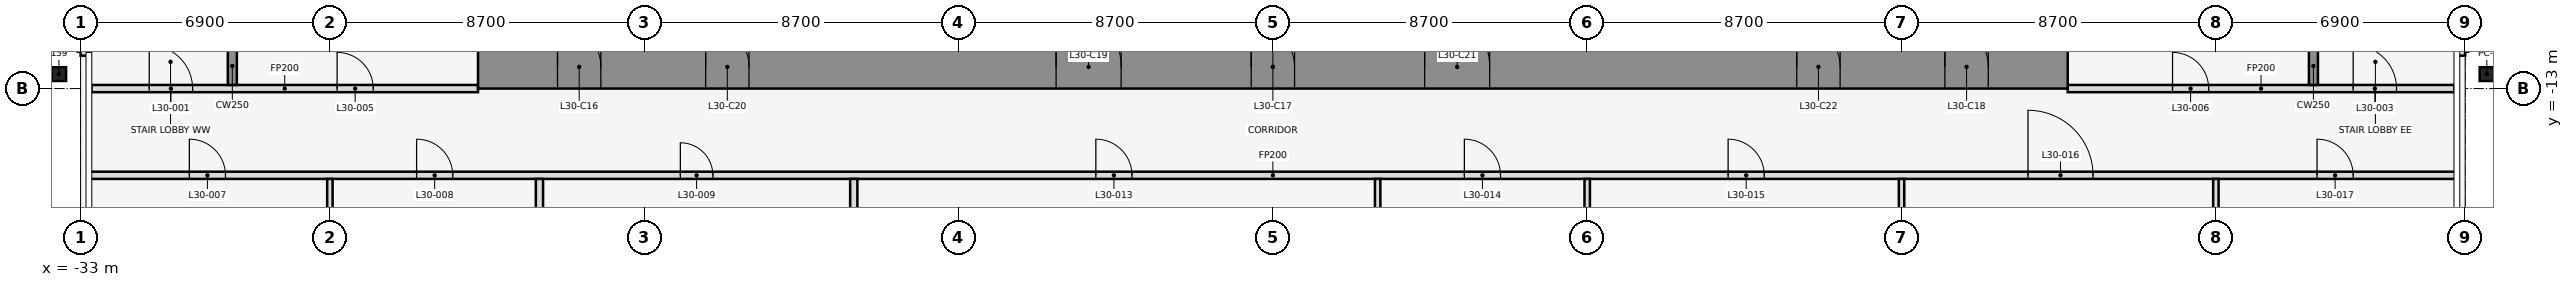
"""IFC4 building model, lengths in metres.
Left out: names, types, materials, properties, quantities, classifications, styles, units other than length and angle.
Written with IfcOpenShell. Run it as: python <this file> out.ifc"""

import sys

from ifc_helpers import new_model, si_unit, direction, frame, frame_2d, origin, origin_2d, place, context, subcontext, project, spatial, rectangle, i_section, extrude, element, fill, save


model = new_model("IFC4")
c1 = context("Model", 3, precision=1e-05, world=origin(), true_north=direction((0.0, 1.0)))
c2 = subcontext(c1, "Body", "Model", "MODEL_VIEW")
j1 = project(units=[si_unit("LENGTHUNIT", "METRE"), si_unit("PLANEANGLEUNIT", "RADIAN")], contexts=[c1])
p1 = place(None, origin())
s1 = spatial("IfcSite", under=j1, at=p1, CompositionType="ELEMENT")
p2 = place(p1, origin())
s2 = spatial("IfcBuilding", under=s1, at=p2, CompositionType="ELEMENT")
p3 = place(p2, frame((0.0, 0.0, 140.4)))
s3 = spatial("IfcBuildingStorey", under=s2, at=p3, CompositionType="ELEMENT", Elevation=140.4)
for number, where, z_axis, x_axis in (
    (1, (-33.6, -12.6, 0.0), (0.0, 0.0, 1.0), (1.0, 0.0, 0.0)),
    (2, (33.6, -12.6, 0.0), (0.0, 0.0, 1.0), (1.0, 0.0, 0.0)),
):
    element("IfcColumn", number, at=place(p3, frame(where, z_axis=z_axis, x_axis=x_axis)), inside=s3, PredefinedType="COLUMN", context=c2, shape_type="SweptSolid", body=[
        extrude(i_section(OverallWidth=0.396, OverallDepth=0.381, WebThickness=0.019, FlangeThickness=0.03, at=origin_2d()), origin(), (0.0, 0.0, 1.0), 4.1),
    ])
for number, where, z_axis, x_axis in (
    (3, (32.875, -12.09, 0.0), (0.0, 0.0, 1.0), (0.0, 1.0, 0.0)),
    (4, (-32.875, -6.0, 0.0), (0.0, 0.0, 1.0), (0.0, -1.0, 0.0)),
):
    element("IfcWall", number, at=place(p3, frame(where, z_axis=z_axis, x_axis=x_axis)), inside=s3, PredefinedType="STANDARD", context=c2, shape_type="SweptSolid", body=[
        extrude(rectangle(XDim=6.09, YDim=0.25, at=frame_2d((3.045, 0.0))), origin(), (0.0, 0.0, 1.0), 3.95),
    ])
p4 = place(p3, frame((-32.79, -15.4, 0.0), z_axis=(0.0, 0.0, 1.0), x_axis=(1.0, 0.0, 0.0)))
e5 = element("IfcWall", 5, at=p4, inside=s3, PredefinedType="PARTITIONING", context=c2, shape_type="SweptSolid", body=[
    extrude(rectangle(XDim=65.58, YDim=0.2, at=frame_2d((32.79, 0.0))), origin(), (0.0, 0.0, 1.0), 2.939),
])
p5 = place(p4, frame((2.8, 0.0, 0.0)))
e6 = element("IfcOpeningElement", 6, at=p5, cuts=e5, PredefinedType="OPENING", context=c2, shape_type="SweptSolid", body=[
    extrude(rectangle(XDim=1.0, YDim=2.1, at=frame_2d((0.5, 1.05))), frame((0.0, 0.112, 0.0), z_axis=(0.0, -1.0, 0.0), x_axis=(1.0, 0.0, 0.0)), (0.0, 0.0, 1.0), 0.224),
])
p6 = place(p4, frame((9.09, 0.0, 0.0)))
e7 = element("IfcOpeningElement", 7, at=p6, cuts=e5, PredefinedType="OPENING", context=c2, shape_type="SweptSolid", body=[
    extrude(rectangle(XDim=1.0, YDim=2.1, at=frame_2d((0.5, 1.05))), frame((0.0, 0.112, 0.0), z_axis=(0.0, -1.0, 0.0), x_axis=(1.0, 0.0, 0.0)), (0.0, 0.0, 1.0), 0.224),
])
p7 = place(p4, frame((16.39, 0.0, 0.0)))
e8 = element("IfcOpeningElement", 8, at=p7, cuts=e5, PredefinedType="OPENING", context=c2, shape_type="SweptSolid", body=[
    extrude(rectangle(XDim=0.9, YDim=2.1, at=frame_2d((0.45, 1.05))), frame((0.0, 0.112, 0.0), z_axis=(0.0, -1.0, 0.0), x_axis=(1.0, 0.0, 0.0)), (0.0, 0.0, 1.0), 0.224),
])
p8 = place(p4, frame((27.89, 0.0, 0.0)))
e9 = element("IfcOpeningElement", 9, at=p8, cuts=e5, PredefinedType="OPENING", context=c2, shape_type="SweptSolid", body=[
    extrude(rectangle(XDim=1.0, YDim=2.1, at=frame_2d((0.5, 1.05))), frame((0.0, 0.112, 0.0), z_axis=(0.0, -1.0, 0.0), x_axis=(1.0, 0.0, 0.0)), (0.0, 0.0, 1.0), 0.224),
])
p9 = place(p4, frame((38.09, 0.0, 0.0)))
e10 = element("IfcOpeningElement", 10, at=p9, cuts=e5, PredefinedType="OPENING", context=c2, shape_type="SweptSolid", body=[
    extrude(rectangle(XDim=1.0, YDim=2.1, at=frame_2d((0.5, 1.05))), frame((0.0, 0.112, 0.0), z_axis=(0.0, -1.0, 0.0), x_axis=(1.0, 0.0, 0.0)), (0.0, 0.0, 1.0), 0.224),
])
p10 = place(p4, frame((45.39, 0.0, 0.0)))
e11 = element("IfcOpeningElement", 11, at=p10, cuts=e5, PredefinedType="OPENING", context=c2, shape_type="SweptSolid", body=[
    extrude(rectangle(XDim=1.0, YDim=2.1, at=frame_2d((0.5, 1.05))), frame((0.0, 0.112, 0.0), z_axis=(0.0, -1.0, 0.0), x_axis=(1.0, 0.0, 0.0)), (0.0, 0.0, 1.0), 0.224),
])
p11 = place(p4, frame((53.69, 0.0, 0.0)))
e12 = element("IfcOpeningElement", 12, at=p11, cuts=e5, PredefinedType="OPENING", context=c2, shape_type="SweptSolid", body=[
    extrude(rectangle(XDim=1.8, YDim=2.1, at=frame_2d((0.9, 1.05))), frame((0.0, 0.112, 0.0), z_axis=(0.0, -1.0, 0.0), x_axis=(1.0, 0.0, 0.0)), (0.0, 0.0, 1.0), 0.224),
])
p12 = place(p4, frame((61.69, 0.0, 0.0)))
e13 = element("IfcOpeningElement", 13, at=p12, cuts=e5, PredefinedType="OPENING", context=c2, shape_type="SweptSolid", body=[
    extrude(rectangle(XDim=1.0, YDim=2.1, at=frame_2d((0.5, 1.05))), frame((0.0, 0.112, 0.0), z_axis=(0.0, -1.0, 0.0), x_axis=(1.0, 0.0, 0.0)), (0.0, 0.0, 1.0), 0.224),
])
p13 = place(p3, frame((-32.7, -13.0, 0.0), z_axis=(0.0, 0.0, 1.0), x_axis=(1.0, 0.0, 0.0)))
e14 = element("IfcWall", 14, at=p13, inside=s3, PredefinedType="PARTITIONING", context=c2, shape_type="SweptSolid", body=[
    extrude(rectangle(XDim=10.7, YDim=0.2, at=frame_2d((5.35, 0.0))), origin(), (0.0, 0.0, 1.0), 2.939),
])
p14 = place(p13, frame((1.6, 0.0, 0.0)))
e15 = element("IfcOpeningElement", 15, at=p14, cuts=e14, PredefinedType="OPENING", context=c2, shape_type="SweptSolid", body=[
    extrude(rectangle(XDim=1.2, YDim=2.1, at=frame_2d((0.6, 1.05))), frame((0.0, 0.112, 0.0), z_axis=(0.0, -1.0, 0.0), x_axis=(1.0, 0.0, 0.0)), (0.0, 0.0, 1.0), 0.224),
])
p15 = place(p13, frame((6.8, 0.0, 0.0)))
e16 = element("IfcOpeningElement", 16, at=p15, cuts=e14, PredefinedType="OPENING", context=c2, shape_type="SweptSolid", body=[
    extrude(rectangle(XDim=1.0, YDim=2.1, at=frame_2d((0.5, 1.05))), frame((0.0, 0.112, 0.0), z_axis=(0.0, -1.0, 0.0), x_axis=(1.0, 0.0, 0.0)), (0.0, 0.0, 1.0), 0.224),
])
p16 = place(p3, frame((22.0, -13.0, 0.0), z_axis=(0.0, 0.0, 1.0), x_axis=(1.0, 0.0, 0.0)))
e17 = element("IfcWall", 17, at=p16, inside=s3, PredefinedType="PARTITIONING", context=c2, shape_type="SweptSolid", body=[
    extrude(rectangle(XDim=10.7, YDim=0.2, at=frame_2d((5.35, 0.0))), origin(), (0.0, 0.0, 1.0), 2.939),
])
p17 = place(p16, frame((7.9, 0.0, 0.0)))
e18 = element("IfcOpeningElement", 18, at=p17, cuts=e17, PredefinedType="OPENING", context=c2, shape_type="SweptSolid", body=[
    extrude(rectangle(XDim=1.2, YDim=2.1, at=frame_2d((0.6, 1.05))), frame((0.0, 0.112, 0.0), z_axis=(0.0, -1.0, 0.0), x_axis=(1.0, 0.0, 0.0)), (0.0, 0.0, 1.0), 0.224),
])
p18 = place(p16, frame((2.9, 0.0, 0.0)))
e19 = element("IfcOpeningElement", 19, at=p18, cuts=e17, PredefinedType="OPENING", context=c2, shape_type="SweptSolid", body=[
    extrude(rectangle(XDim=1.0, YDim=2.1, at=frame_2d((0.5, 1.05))), frame((0.0, 0.112, 0.0), z_axis=(0.0, -1.0, 0.0), x_axis=(1.0, 0.0, 0.0)), (0.0, 0.0, 1.0), 0.224),
])
p19 = place(p3, frame((-28.8, -12.9, 0.0), z_axis=(0.0, 0.0, 1.0), x_axis=(0.0, 1.0, 0.0)))
e20 = element("IfcWall", 20, at=p19, inside=s3, PredefinedType="SHEAR", context=c2, shape_type="SweptSolid", body=[
    extrude(rectangle(XDim=1.05, YDim=0.25, at=frame_2d((0.525, 0.0))), origin(), (0.0, 0.0, 1.0), 4.1),
])
p20 = place(p3, frame((-26.1, -32.93, 0.0), z_axis=(0.0, 0.0, 1.0), x_axis=(0.0, 1.0, 0.0)))
e21 = element("IfcWall", 21, at=p20, inside=s3, PredefinedType="PARTITIONING", context=c2, shape_type="SweptSolid", body=[
    extrude(rectangle(XDim=17.43, YDim=0.15, at=frame_2d((8.715, 0.0))), origin(), (0.0, 0.0, 1.0), 2.939),
])
p21 = place(p3, frame((-20.3, -32.93, 0.0), z_axis=(0.0, 0.0, 1.0), x_axis=(0.0, 1.0, 0.0)))
e22 = element("IfcWall", 22, at=p21, inside=s3, PredefinedType="PARTITIONING", context=c2, shape_type="SweptSolid", body=[
    extrude(rectangle(XDim=17.43, YDim=0.2, at=frame_2d((8.715, 0.0))), origin(), (0.0, 0.0, 1.0), 2.939),
])
p22 = place(p3, frame((-11.6, -21.725, 0.0), z_axis=(0.0, 0.0, 1.0), x_axis=(0.0, 1.0, 0.0)))
e23 = element("IfcWall", 23, at=p22, inside=s3, PredefinedType="PARTITIONING", context=c2, shape_type="SweptSolid", body=[
    extrude(rectangle(XDim=6.225, YDim=0.2, at=frame_2d((3.113, 0.0))), origin(), (0.0, 0.0, 1.0), 2.939),
])
p23 = place(p3, frame((2.9, -34.2, 0.0), z_axis=(0.0, 0.0, 1.0), x_axis=(0.0, 1.0, 0.0)))
e24 = element("IfcWall", 24, at=p23, inside=s3, PredefinedType="PARTITIONING", context=c2, shape_type="SweptSolid", body=[
    extrude(rectangle(XDim=18.7, YDim=0.15, at=frame_2d((9.35, 0.0))), origin(), (0.0, 0.0, 1.0), 2.939),
])
p24 = place(p3, frame((8.7, -36.489, 0.0), z_axis=(0.0, 0.0, 1.0), x_axis=(0.0, 1.0, 0.0)))
e25 = element("IfcWall", 25, at=p24, inside=s3, PredefinedType="PARTITIONING", context=c2, shape_type="SweptSolid", body=[
    extrude(rectangle(XDim=20.989, YDim=0.15, at=frame_2d((10.495, 0.0))), origin(), (0.0, 0.0, 1.0), 2.939),
])
p25 = place(p3, frame((17.4, -33.508, 0.0), z_axis=(0.0, 0.0, 1.0), x_axis=(0.0, 1.0, 0.0)))
e26 = element("IfcWall", 26, at=p25, inside=s3, PredefinedType="PARTITIONING", context=c2, shape_type="SweptSolid", body=[
    extrude(rectangle(XDim=18.008, YDim=0.15, at=frame_2d((9.004, 0.0))), origin(), (0.0, 0.0, 1.0), 2.939),
])
p26 = place(p3, frame((26.1, -32.93, 0.0), z_axis=(0.0, 0.0, 1.0), x_axis=(0.0, 1.0, 0.0)))
e27 = element("IfcWall", 27, at=p26, inside=s3, PredefinedType="PARTITIONING", context=c2, shape_type="SweptSolid", body=[
    extrude(rectangle(XDim=17.43, YDim=0.15, at=frame_2d((8.715, 0.0))), origin(), (0.0, 0.0, 1.0), 2.939),
])
p27 = place(p3, frame((28.8, -12.9, 0.0), z_axis=(0.0, 0.0, 1.0), x_axis=(0.0, 1.0, 0.0)))
e28 = element("IfcWall", 28, at=p27, inside=s3, PredefinedType="SHEAR", context=c2, shape_type="SweptSolid", body=[
    extrude(rectangle(XDim=1.05, YDim=0.25, at=frame_2d((0.525, 0.0))), origin(), (0.0, 0.0, 1.0), 4.1),
])
p28 = place(p3, frame((-22.0, -12.4, 0.0), z_axis=(0.0, 0.0, 1.0), x_axis=(1.0, 0.0, 0.0)))
e29 = element("IfcWall", 29, at=p28, inside=s3, PredefinedType="SHEAR", context=c2, shape_type="SweptSolid", body=[
    extrude(rectangle(XDim=44.0, YDim=1.2, at=frame_2d((22.0, 0.0))), origin(), (0.0, 0.0, 1.0), 4.1),
])
p29 = place(p28, frame((2.2, 0.0, 0.0)))
e30 = element("IfcOpeningElement", 30, at=p29, cuts=e29, PredefinedType="OPENING", context=c2, shape_type="SweptSolid", body=[
    extrude(rectangle(XDim=1.2, YDim=2.1, at=frame_2d((0.6, 1.05))), frame((0.0, 0.612, 0.0), z_axis=(0.0, -1.0, 0.0), x_axis=(1.0, 0.0, 0.0)), (0.0, 0.0, 1.0), 1.224),
])
p30 = place(p28, frame((21.4, 0.0, 0.0)))
e31 = element("IfcOpeningElement", 31, at=p30, cuts=e29, PredefinedType="OPENING", context=c2, shape_type="SweptSolid", body=[
    extrude(rectangle(XDim=1.2, YDim=2.1, at=frame_2d((0.6, 1.05))), frame((0.0, 0.612, 0.0), z_axis=(0.0, -1.0, 0.0), x_axis=(1.0, 0.0, 0.0)), (0.0, 0.0, 1.0), 1.224),
])
p31 = place(p28, frame((40.6, 0.0, 0.0)))
e32 = element("IfcOpeningElement", 32, at=p31, cuts=e29, PredefinedType="OPENING", context=c2, shape_type="SweptSolid", body=[
    extrude(rectangle(XDim=1.2, YDim=2.1, at=frame_2d((0.6, 1.05))), frame((0.0, 0.612, 0.0), z_axis=(0.0, -1.0, 0.0), x_axis=(1.0, 0.0, 0.0)), (0.0, 0.0, 1.0), 1.224),
])
p32 = place(p28, frame((16.0, 0.0, 0.0)))
e33 = element("IfcOpeningElement", 33, at=p32, cuts=e29, PredefinedType="OPENING", context=c2, shape_type="SweptSolid", body=[
    extrude(rectangle(XDim=1.8, YDim=2.1, at=frame_2d((0.9, 1.05))), frame((0.0, 0.612, 0.0), z_axis=(0.0, -1.0, 0.0), x_axis=(1.0, 0.0, 0.0)), (0.0, 0.0, 1.0), 1.224),
])
p33 = place(p28, frame((6.3, 0.0, 0.0)))
e34 = element("IfcOpeningElement", 34, at=p33, cuts=e29, PredefinedType="OPENING", context=c2, shape_type="SweptSolid", body=[
    extrude(rectangle(XDim=1.2, YDim=2.1, at=frame_2d((0.6, 1.05))), frame((0.0, 0.612, 0.0), z_axis=(0.0, -1.0, 0.0), x_axis=(1.0, 0.0, 0.0)), (0.0, 0.0, 1.0), 1.224),
])
p34 = place(p28, frame((26.2, 0.0, 0.0)))
e35 = element("IfcOpeningElement", 35, at=p34, cuts=e29, PredefinedType="OPENING", context=c2, shape_type="SweptSolid", body=[
    extrude(rectangle(XDim=1.8, YDim=2.1, at=frame_2d((0.9, 1.05))), frame((0.0, 0.612, 0.0), z_axis=(0.0, -1.0, 0.0), x_axis=(1.0, 0.0, 0.0)), (0.0, 0.0, 1.0), 1.224),
])
p35 = place(p28, frame((36.5, 0.0, 0.0)))
e36 = element("IfcOpeningElement", 36, at=p35, cuts=e29, PredefinedType="OPENING", context=c2, shape_type="SweptSolid", body=[
    extrude(rectangle(XDim=1.2, YDim=2.1, at=frame_2d((0.6, 1.05))), frame((0.0, 0.612, 0.0), z_axis=(0.0, -1.0, 0.0), x_axis=(1.0, 0.0, 0.0)), (0.0, 0.0, 1.0), 1.224),
])
p36 = place(p14, origin())
e37 = element("IfcDoor", 37, at=p36, inside=s3, OperationType="SINGLE_SWING_LEFT", PredefinedType="DOOR", context=c2, shape_type="SweptSolid", body=[
    extrude(rectangle(XDim=1.2, YDim=2.1, at=frame_2d((0.6, 1.05))), frame((0.0, 0.025, 0.0), z_axis=(0.0, -1.0, 0.0), x_axis=(1.0, 0.0, 0.0)), (0.0, 0.0, 1.0), 0.05),
])
fill(e15, e37)
p37 = place(p17, origin())
e38 = element("IfcDoor", 38, at=p37, inside=s3, OperationType="SINGLE_SWING_RIGHT", PredefinedType="DOOR", context=c2, shape_type="SweptSolid", body=[
    extrude(rectangle(XDim=1.2, YDim=2.1, at=frame_2d((0.6, 1.05))), frame((0.0, 0.025, 0.0), z_axis=(0.0, -1.0, 0.0), x_axis=(1.0, 0.0, 0.0)), (0.0, 0.0, 1.0), 0.05),
])
fill(e18, e38)
p38 = place(p15, origin())
e39 = element("IfcDoor", 39, at=p38, inside=s3, OperationType="SINGLE_SWING_LEFT", PredefinedType="DOOR", context=c2, shape_type="SweptSolid", body=[
    extrude(rectangle(XDim=1.0, YDim=2.1, at=frame_2d((0.5, 1.05))), frame((0.0, 0.025, 0.0), z_axis=(0.0, -1.0, 0.0), x_axis=(1.0, 0.0, 0.0)), (0.0, 0.0, 1.0), 0.05),
])
fill(e16, e39)
p39 = place(p18, origin())
e40 = element("IfcDoor", 40, at=p39, inside=s3, OperationType="SINGLE_SWING_RIGHT", PredefinedType="DOOR", context=c2, shape_type="SweptSolid", body=[
    extrude(rectangle(XDim=1.0, YDim=2.1, at=frame_2d((0.5, 1.05))), frame((0.0, 0.025, 0.0), z_axis=(0.0, -1.0, 0.0), x_axis=(1.0, 0.0, 0.0)), (0.0, 0.0, 1.0), 0.05),
])
fill(e19, e40)
p40 = place(p5, frame((1.0, 0.0, 0.0), z_axis=(0.0, 0.0, 1.0), x_axis=(-1.0, 0.0, 0.0)))
e41 = element("IfcDoor", 41, at=p40, inside=s3, OperationType="SINGLE_SWING_LEFT", PredefinedType="DOOR", context=c2, shape_type="SweptSolid", body=[
    extrude(rectangle(XDim=1.0, YDim=2.1, at=frame_2d((0.5, 1.05))), frame((0.0, 0.025, 0.0), z_axis=(0.0, -1.0, 0.0), x_axis=(1.0, 0.0, 0.0)), (0.0, 0.0, 1.0), 0.05),
])
fill(e6, e41)
p41 = place(p6, frame((1.0, 0.0, 0.0), z_axis=(0.0, 0.0, 1.0), x_axis=(-1.0, 0.0, 0.0)))
e42 = element("IfcDoor", 42, at=p41, inside=s3, OperationType="SINGLE_SWING_RIGHT", PredefinedType="DOOR", context=c2, shape_type="SweptSolid", body=[
    extrude(rectangle(XDim=1.0, YDim=2.1, at=frame_2d((0.5, 1.05))), frame((0.0, 0.025, 0.0), z_axis=(0.0, -1.0, 0.0), x_axis=(1.0, 0.0, 0.0)), (0.0, 0.0, 1.0), 0.05),
])
fill(e7, e42)
p42 = place(p7, frame((0.9, 0.0, 0.0), z_axis=(0.0, 0.0, 1.0), x_axis=(-1.0, 0.0, 0.0)))
e43 = element("IfcDoor", 43, at=p42, inside=s3, OperationType="SINGLE_SWING_RIGHT", PredefinedType="DOOR", context=c2, shape_type="SweptSolid", body=[
    extrude(rectangle(XDim=0.9, YDim=2.1, at=frame_2d((0.45, 1.05))), frame((0.0, 0.025, 0.0), z_axis=(0.0, -1.0, 0.0), x_axis=(1.0, 0.0, 0.0)), (0.0, 0.0, 1.0), 0.05),
])
fill(e8, e43)
p43 = place(p8, frame((1.0, 0.0, 0.0), z_axis=(0.0, 0.0, 1.0), x_axis=(-1.0, 0.0, 0.0)))
e44 = element("IfcDoor", 44, at=p43, inside=s3, OperationType="SINGLE_SWING_LEFT", PredefinedType="DOOR", context=c2, shape_type="SweptSolid", body=[
    extrude(rectangle(XDim=1.0, YDim=2.1, at=frame_2d((0.5, 1.05))), frame((0.0, 0.025, 0.0), z_axis=(0.0, -1.0, 0.0), x_axis=(1.0, 0.0, 0.0)), (0.0, 0.0, 1.0), 0.05),
])
fill(e9, e44)
p44 = place(p9, frame((1.0, 0.0, 0.0), z_axis=(0.0, 0.0, 1.0), x_axis=(-1.0, 0.0, 0.0)))
e45 = element("IfcDoor", 45, at=p44, inside=s3, OperationType="SINGLE_SWING_RIGHT", PredefinedType="DOOR", context=c2, shape_type="SweptSolid", body=[
    extrude(rectangle(XDim=1.0, YDim=2.1, at=frame_2d((0.5, 1.05))), frame((0.0, 0.025, 0.0), z_axis=(0.0, -1.0, 0.0), x_axis=(1.0, 0.0, 0.0)), (0.0, 0.0, 1.0), 0.05),
])
fill(e10, e45)
p45 = place(p10, frame((1.0, 0.0, 0.0), z_axis=(0.0, 0.0, 1.0), x_axis=(-1.0, 0.0, 0.0)))
e46 = element("IfcDoor", 46, at=p45, inside=s3, OperationType="SINGLE_SWING_RIGHT", PredefinedType="DOOR", context=c2, shape_type="SweptSolid", body=[
    extrude(rectangle(XDim=1.0, YDim=2.1, at=frame_2d((0.5, 1.05))), frame((0.0, 0.025, 0.0), z_axis=(0.0, -1.0, 0.0), x_axis=(1.0, 0.0, 0.0)), (0.0, 0.0, 1.0), 0.05),
])
fill(e11, e46)
p46 = place(p11, origin())
e47 = element("IfcDoor", 47, at=p46, inside=s3, OperationType="SINGLE_SWING_LEFT", PredefinedType="DOOR", context=c2, shape_type="SweptSolid", body=[
    extrude(rectangle(XDim=1.8, YDim=2.1, at=frame_2d((0.9, 1.05))), frame((0.0, 0.025, 0.0), z_axis=(0.0, -1.0, 0.0), x_axis=(1.0, 0.0, 0.0)), (0.0, 0.0, 1.0), 0.05),
])
fill(e12, e47)
p47 = place(p12, frame((1.0, 0.0, 0.0), z_axis=(0.0, 0.0, 1.0), x_axis=(-1.0, 0.0, 0.0)))
e48 = element("IfcDoor", 48, at=p47, inside=s3, OperationType="SINGLE_SWING_RIGHT", PredefinedType="DOOR", context=c2, shape_type="SweptSolid", body=[
    extrude(rectangle(XDim=1.0, YDim=2.1, at=frame_2d((0.5, 1.05))), frame((0.0, 0.025, 0.0), z_axis=(0.0, -1.0, 0.0), x_axis=(1.0, 0.0, 0.0)), (0.0, 0.0, 1.0), 0.05),
])
fill(e13, e48)
p48 = place(p29, frame((1.2, 0.0, 0.0), z_axis=(0.0, 0.0, 1.0), x_axis=(-1.0, 0.0, 0.0)))
e49 = element("IfcDoor", 49, at=p48, inside=s3, OperationType="SINGLE_SWING_RIGHT", PredefinedType="DOOR", context=c2, shape_type="SweptSolid", body=[
    extrude(rectangle(XDim=1.2, YDim=2.1, at=frame_2d((0.6, 1.05))), frame((0.0, 0.025, 0.0), z_axis=(0.0, -1.0, 0.0), x_axis=(1.0, 0.0, 0.0)), (0.0, 0.0, 1.0), 0.05),
])
fill(e30, e49)
p49 = place(p30, frame((1.2, 0.0, 0.0), z_axis=(0.0, 0.0, 1.0), x_axis=(-1.0, 0.0, 0.0)))
e50 = element("IfcDoor", 50, at=p49, inside=s3, OperationType="SINGLE_SWING_RIGHT", PredefinedType="DOOR", context=c2, shape_type="SweptSolid", body=[
    extrude(rectangle(XDim=1.2, YDim=2.1, at=frame_2d((0.6, 1.05))), frame((0.0, 0.025, 0.0), z_axis=(0.0, -1.0, 0.0), x_axis=(1.0, 0.0, 0.0)), (0.0, 0.0, 1.0), 0.05),
])
fill(e31, e50)
p50 = place(p31, frame((1.2, 0.0, 0.0), z_axis=(0.0, 0.0, 1.0), x_axis=(-1.0, 0.0, 0.0)))
e51 = element("IfcDoor", 51, at=p50, inside=s3, OperationType="SINGLE_SWING_RIGHT", PredefinedType="DOOR", context=c2, shape_type="SweptSolid", body=[
    extrude(rectangle(XDim=1.2, YDim=2.1, at=frame_2d((0.6, 1.05))), frame((0.0, 0.025, 0.0), z_axis=(0.0, -1.0, 0.0), x_axis=(1.0, 0.0, 0.0)), (0.0, 0.0, 1.0), 0.05),
])
fill(e32, e51)
p51 = place(p32, origin())
e52 = element("IfcDoor", 52, at=p51, inside=s3, OperationType="SINGLE_SWING_LEFT", PredefinedType="DOOR", context=c2, shape_type="SweptSolid", body=[
    extrude(rectangle(XDim=1.8, YDim=2.1, at=frame_2d((0.9, 1.05))), frame((0.0, 0.025, 0.0), z_axis=(0.0, -1.0, 0.0), x_axis=(1.0, 0.0, 0.0)), (0.0, 0.0, 1.0), 0.05),
])
fill(e33, e52)
p52 = place(p33, frame((1.2, 0.0, 0.0), z_axis=(0.0, 0.0, 1.0), x_axis=(-1.0, 0.0, 0.0)))
e53 = element("IfcDoor", 53, at=p52, inside=s3, OperationType="SINGLE_SWING_RIGHT", PredefinedType="DOOR", context=c2, shape_type="SweptSolid", body=[
    extrude(rectangle(XDim=1.2, YDim=2.1, at=frame_2d((0.6, 1.05))), frame((0.0, 0.025, 0.0), z_axis=(0.0, -1.0, 0.0), x_axis=(1.0, 0.0, 0.0)), (0.0, 0.0, 1.0), 0.05),
])
fill(e34, e53)
p53 = place(p34, origin())
e54 = element("IfcDoor", 54, at=p53, inside=s3, OperationType="SINGLE_SWING_LEFT", PredefinedType="DOOR", context=c2, shape_type="SweptSolid", body=[
    extrude(rectangle(XDim=1.8, YDim=2.1, at=frame_2d((0.9, 1.05))), frame((0.0, 0.025, 0.0), z_axis=(0.0, -1.0, 0.0), x_axis=(1.0, 0.0, 0.0)), (0.0, 0.0, 1.0), 0.05),
])
fill(e35, e54)
p54 = place(p35, frame((1.2, 0.0, 0.0), z_axis=(0.0, 0.0, 1.0), x_axis=(-1.0, 0.0, 0.0)))
e55 = element("IfcDoor", 55, at=p54, inside=s3, OperationType="SINGLE_SWING_RIGHT", PredefinedType="DOOR", context=c2, shape_type="SweptSolid", body=[
    extrude(rectangle(XDim=1.2, YDim=2.1, at=frame_2d((0.6, 1.05))), frame((0.0, 0.025, 0.0), z_axis=(0.0, -1.0, 0.0), x_axis=(1.0, 0.0, 0.0)), (0.0, 0.0, 1.0), 0.05),
])
fill(e36, e55)
save(model, sys.argv[1])
